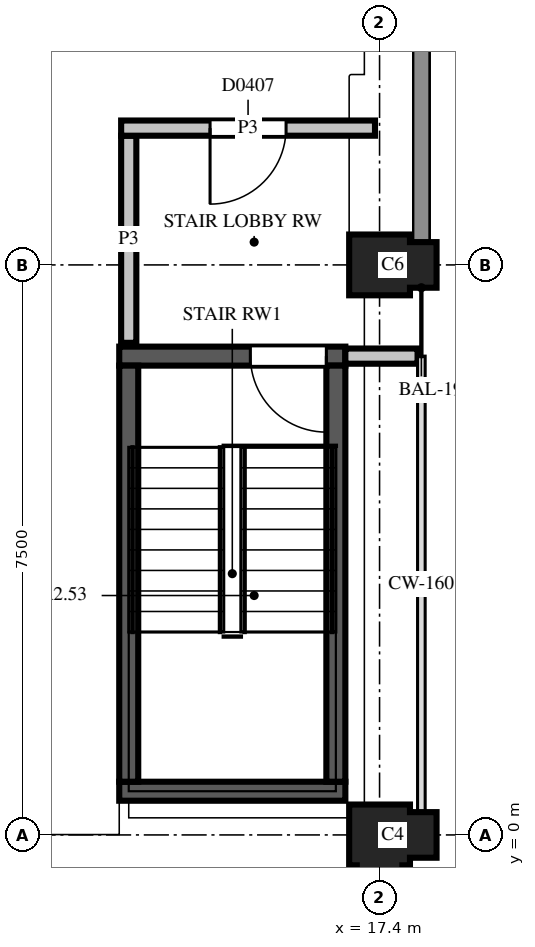
"""IFC4 building model, lengths in metres.
Left out: names, types, materials, properties, quantities, classifications, styles, units other than length and angle.
Written with IfcOpenShell. Run it as: python <this file> out.ifc"""

import sys

from ifc_helpers import new_model, si_unit, direction, frame, frame_2d, origin, place, context, subcontext, project, spatial, polyline, rectangle, outline, extrude, element, fill, save


model = new_model("IFC4")
c1 = context("Model", 3, precision=1e-05, world=origin(), true_north=direction((0.0, 1.0)))
c2 = subcontext(c1, "Body", "Model", "MODEL_VIEW")
j1 = project(units=[si_unit("LENGTHUNIT", "METRE"), si_unit("PLANEANGLEUNIT", "RADIAN")], contexts=[c1])
p1 = place(None, origin())
s1 = spatial("IfcSite", under=j1, at=p1, CompositionType="ELEMENT")
p2 = place(p1, origin())
s2 = spatial("IfcBuilding", under=s1, at=p2, CompositionType="ELEMENT")
p3 = place(p2, frame((0.0, 0.0, 15.6)))
s3 = spatial("IfcBuildingStorey", under=s2, at=p3, CompositionType="ELEMENT", Elevation=15.6)
p4 = place(p3, frame((17.4, 0.0, 0.0), z_axis=(0.0, 0.0, 1.0), x_axis=(0.0, -1.0, 0.0)))
e1 = element("IfcColumn", 1, at=p4, inside=s3, PredefinedType="COLUMN", context=c2, shape_type="SweptSolid", body=[
    extrude(outline(polyline([(-0.4, -0.4), (0.4, -0.4), (0.4, -0.3), (0.75, -0.3), (0.75, 0.3), (0.4, 0.3), (0.4, 0.4), (0.3, 0.4), (0.3, 0.75), (-0.3, 0.75), (-0.3, 0.4), (-0.4, 0.4), (-0.4, -0.4)])), origin(), (0.0, 0.0, 1.0), 3.7),
])
p5 = place(p3, frame((17.4, 7.5, 0.0), z_axis=(0.0, 0.0, 1.0), x_axis=(1.0, 0.0, 0.0)))
e2 = element("IfcColumn", 2, at=p5, inside=s3, PredefinedType="COLUMN", context=c2, shape_type="SweptSolid", body=[
    extrude(outline(polyline([(-0.4, -0.4), (0.4, -0.4), (0.4, -0.3), (0.75, -0.3), (0.75, 0.3), (0.4, 0.3), (0.4, 0.4), (-0.4, 0.4), (-0.4, -0.4)])), origin(), (0.0, 0.0, 1.0), 3.7),
])
p6 = place(p3, frame((13.975, 0.575, 0.0), z_axis=(0.0, 0.0, 1.0), x_axis=(1.0, 0.0, 0.0)))
e3 = element("IfcWall", 3, at=p6, inside=s3, PredefinedType="SHEAR", context=c2, shape_type="SweptSolid", body=[
    extrude(rectangle(XDim=2.975, YDim=0.25, at=frame_2d((1.487, 0.0))), origin(), (0.0, 0.0, 1.0), 3.7),
])
p7 = place(p3, frame((13.975, 6.3, 0.0), z_axis=(0.0, 0.0, 1.0), x_axis=(1.0, 0.0, 0.0)))
e4 = element("IfcWall", 4, at=p7, inside=s3, PredefinedType="SHEAR", context=c2, shape_type="SweptSolid", body=[
    extrude(rectangle(XDim=2.975, YDim=0.25, at=frame_2d((1.487, 0.0))), origin(), (0.0, 0.0, 1.0), 3.7),
])
p8 = place(p7, frame((1.725, 0.0, 0.0)))
e5 = element("IfcOpeningElement", 5, at=p8, cuts=e4, PredefinedType="OPENING", context=c2, shape_type="SweptSolid", body=[
    extrude(rectangle(XDim=1.0, YDim=2.1, at=frame_2d((0.5, 1.05))), frame((0.0, 0.135, 0.0), z_axis=(0.0, -1.0, 0.0), x_axis=(1.0, 0.0, 0.0)), (0.0, 0.0, 1.0), 0.27),
])
for number, where, z_axis, x_axis in (
    (6, (14.1, 0.7, 0.0), (0.0, 0.0, 1.0), (0.0, 1.0, 0.0)),
    (7, (16.825, 0.7, 0.0), (0.0, 0.0, 1.0), (0.0, 1.0, 0.0)),
):
    element("IfcWall", number, at=place(p3, frame(where, z_axis=z_axis, x_axis=x_axis)), inside=s3, PredefinedType="SHEAR", context=c2, shape_type="SweptSolid", body=[
        extrude(rectangle(XDim=5.475, YDim=0.25, at=frame_2d((2.738, 0.0))), origin(), (0.0, 0.0, 1.0), 3.7),
    ])
p9 = place(p3, frame((16.95, 6.3, 0.0), z_axis=(0.0, 0.0, 1.0), x_axis=(1.0, 0.0, 0.0)))
e8 = element("IfcWall", 8, at=p9, inside=s3, PredefinedType="PARTITIONING", context=c2, shape_type="SweptSolid", body=[
    extrude(rectangle(XDim=0.95, YDim=0.2, at=frame_2d((0.475, 0.0))), origin(), (0.0, 0.0, 1.0), 2.88),
])
p10 = place(p3, frame((14.1, 9.2, 0.0), z_axis=(0.0, 0.0, 1.0), x_axis=(0.0, -1.0, 0.0)))
e9 = element("IfcWall", 9, at=p10, inside=s3, PredefinedType="PARTITIONING", context=c2, shape_type="SweptSolid", body=[
    extrude(rectangle(XDim=2.725, YDim=0.2, at=frame_2d((1.362, 0.0))), origin(), (0.0, 0.0, 1.0), 2.88),
])
p11 = place(p3, frame((17.34, 9.3, 0.0), z_axis=(0.0, 0.0, 1.0), x_axis=(-1.0, 0.0, 0.0)))
e10 = element("IfcWall", 10, at=p11, inside=s3, PredefinedType="PARTITIONING", context=c2, shape_type="SweptSolid", body=[
    extrude(rectangle(XDim=3.34, YDim=0.2, at=frame_2d((1.67, 0.0))), origin(), (0.0, 0.0, 1.0), 2.88),
])
p12 = place(p11, frame((1.17, 0.0, 0.0)))
e11 = element("IfcOpeningElement", 11, at=p12, cuts=e10, PredefinedType="OPENING", context=c2, shape_type="SweptSolid", body=[
    extrude(rectangle(XDim=1.0, YDim=2.1, at=frame_2d((0.5, 1.05))), frame((0.0, 0.11, 0.0), z_axis=(0.0, -1.0, 0.0), x_axis=(1.0, 0.0, 0.0)), (0.0, 0.0, 1.0), 0.22),
])
p13 = place(p12, origin())
e12 = element("IfcDoor", 12, at=p13, inside=s3, OperationType="SINGLE_SWING_LEFT", PredefinedType="DOOR", context=c2, shape_type="SweptSolid", body=[
    extrude(rectangle(XDim=1.0, YDim=2.1, at=frame_2d((0.5, 1.05))), frame((0.0, 0.025, 0.0), z_axis=(0.0, -1.0, 0.0), x_axis=(1.0, 0.0, 0.0)), (0.0, 0.0, 1.0), 0.05),
])
fill(e11, e12)
p14 = place(p8, origin())
e13 = element("IfcDoor", 13, at=p14, inside=s3, OperationType="SINGLE_SWING_RIGHT", PredefinedType="DOOR", context=c2, shape_type="SweptSolid", body=[
    extrude(rectangle(XDim=1.0, YDim=2.1, at=frame_2d((0.5, 1.05))), frame((0.0, 0.025, 0.0), z_axis=(0.0, -1.0, 0.0), x_axis=(1.0, 0.0, 0.0)), (0.0, 0.0, 1.0), 0.05),
])
fill(e5, e13)
save(model, sys.argv[1])
